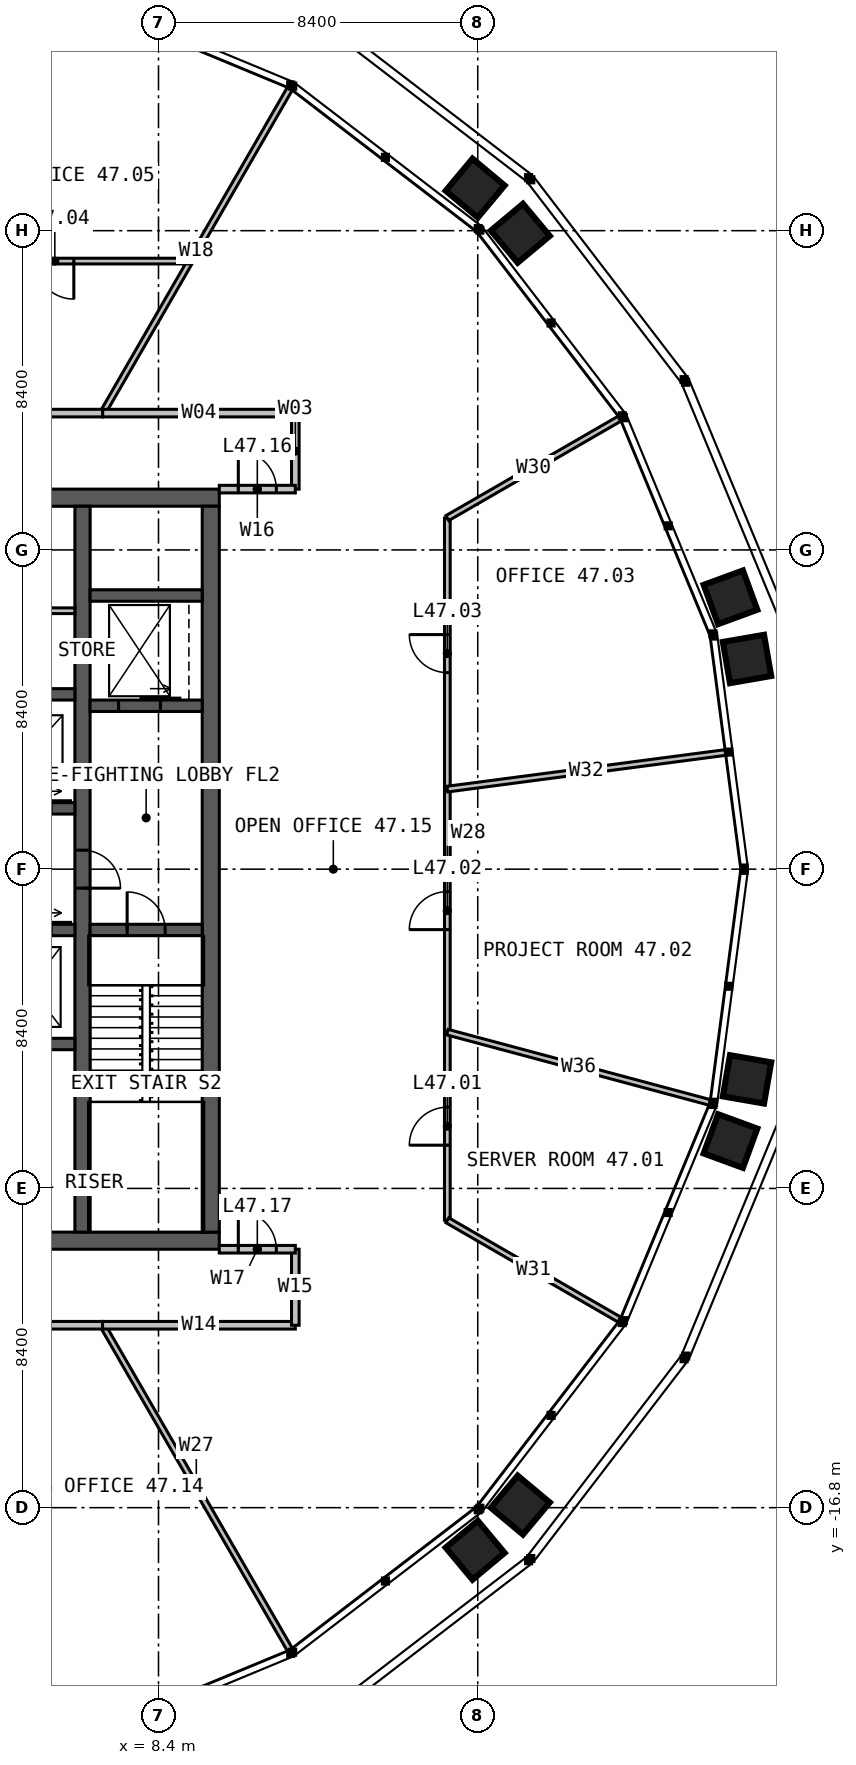
"""IFC4 building model, lengths in metres.
Left out: names, types, materials, properties, quantities, classifications, styles, units other than length and angle.
Written with IfcOpenShell. Run it as: python <this file> out.ifc"""

import sys

from ifc_helpers import new_model, si_unit, direction, frame, frame_2d, origin, place, context, subcontext, project, spatial, rectangle, extrude, element, fill, save


model = new_model("IFC4")
c1 = context("Model", 3, precision=1e-05, world=origin(), true_north=direction((0.0, 1.0)))
c2 = subcontext(c1, "Body", "Model", "MODEL_VIEW")
j1 = project(units=[si_unit("LENGTHUNIT", "METRE"), si_unit("PLANEANGLEUNIT", "RADIAN")], contexts=[c1])
p1 = place(None, origin())
s1 = spatial("IfcSite", under=j1, at=p1, CompositionType="ELEMENT")
p2 = place(p1, origin())
s2 = spatial("IfcBuilding", under=s1, at=p2, CompositionType="ELEMENT")
p3 = place(p2, frame((0.0, 0.0, 195.0)))
s3 = spatial("IfcBuildingStorey", under=s2, at=p3, CompositionType="ELEMENT", Elevation=195.0)
p4 = place(p3, frame((-10.0, 9.775, 0.0), z_axis=(0.0, 0.0, 1.0), x_axis=(1.0, 0.0, 0.0)))
e1 = element("IfcWall", 1, at=p4, inside=s3, PredefinedType="SOLIDWALL", context=c2, shape_type="SweptSolid", body=[
    extrude(rectangle(XDim=20.0, YDim=0.45, at=frame_2d((10.0, 0.0))), origin(), (0.0, 0.0, 1.0), 4.0),
])
p5 = place(p4, frame((9.4, 0.0, 0.0)))
e2 = element("IfcOpeningElement", 2, at=p5, cuts=e1, PredefinedType="OPENING", context=c2, shape_type="SweptSolid", body=[
    extrude(rectangle(XDim=1.2, YDim=2.2, at=frame_2d((0.6, 1.1))), frame((0.0, 0.235, 0.0), z_axis=(0.0, -1.0, 0.0), x_axis=(1.0, 0.0, 0.0)), (0.0, 0.0, 1.0), 0.47),
])
p6 = place(p3, frame((10.0, -9.775, 0.0), z_axis=(0.0, 0.0, 1.0), x_axis=(-1.0, 0.0, 0.0)))
e3 = element("IfcWall", 3, at=p6, inside=s3, PredefinedType="SOLIDWALL", context=c2, shape_type="SweptSolid", body=[
    extrude(rectangle(XDim=20.0, YDim=0.45, at=frame_2d((10.0, 0.0))), origin(), (0.0, 0.0, 1.0), 4.0),
])
p7 = place(p6, frame((6.875, 0.0, 0.0)))
e4 = element("IfcOpeningElement", 4, at=p7, cuts=e3, PredefinedType="OPENING", context=c2, shape_type="SweptSolid", body=[
    extrude(rectangle(XDim=1.2, YDim=2.2, at=frame_2d((0.6, 1.1))), frame((0.0, 0.235, 0.0), z_axis=(0.0, -1.0, 0.0), x_axis=(1.0, 0.0, 0.0)), (0.0, 0.0, 1.0), 0.47),
])
p8 = place(p3, frame((9.775, -9.55, 0.0), z_axis=(0.0, 0.0, 1.0), x_axis=(0.0, 1.0, 0.0)))
e5 = element("IfcWall", 5, at=p8, inside=s3, PredefinedType="SOLIDWALL", context=c2, shape_type="SweptSolid", body=[
    extrude(rectangle(XDim=19.1, YDim=0.45, at=frame_2d((9.55, 0.0))), origin(), (0.0, 0.0, 1.0), 4.0),
])
p9 = place(p3, frame((6.4, 9.55, 0.0), z_axis=(0.0, 0.0, 1.0), x_axis=(0.0, -1.0, 0.0)))
e6 = element("IfcWall", 6, at=p9, inside=s3, PredefinedType="SOLIDWALL", context=c2, shape_type="SweptSolid", body=[
    extrude(rectangle(XDim=19.1, YDim=0.4, at=frame_2d((9.55, 0.0))), origin(), (0.0, 0.0, 1.0), 4.0),
])
p10 = place(p9, frame((9.05, 0.0, 0.0)))
e7 = element("IfcOpeningElement", 7, at=p10, cuts=e6, PredefinedType="OPENING", context=c2, shape_type="SweptSolid", body=[
    extrude(rectangle(XDim=1.0, YDim=2.2, at=frame_2d((0.5, 1.1))), frame((0.0, 0.21, 0.0), z_axis=(0.0, -1.0, 0.0), x_axis=(1.0, 0.0, 0.0)), (0.0, 0.0, 1.0), 0.42),
])
p11 = place(p3, frame((1.35, 1.6, 0.0), z_axis=(0.0, 0.0, 1.0), x_axis=(1.0, 0.0, 0.0)))
e8 = element("IfcWall", 8, at=p11, inside=s3, PredefinedType="SOLIDWALL", context=c2, shape_type="SweptSolid", body=[
    extrude(rectangle(XDim=4.85, YDim=0.3, at=frame_2d((2.425, 0.0))), origin(), (0.0, 0.0, 1.0), 4.0),
])
p12 = place(p11, frame((0.6, 0.0, 0.0)))
e9 = element("IfcOpeningElement", 9, at=p12, cuts=e8, PredefinedType="OPENING", context=c2, shape_type="SweptSolid", body=[
    extrude(rectangle(XDim=1.1, YDim=2.2, at=frame_2d((0.55, 1.1))), frame((0.0, 0.16, 0.0), z_axis=(0.0, -1.0, 0.0), x_axis=(1.0, 0.0, 0.0)), (0.0, 0.0, 1.0), 0.32),
])
p13 = place(p11, frame((3.125, 0.0, 0.0)))
e10 = element("IfcOpeningElement", 10, at=p13, cuts=e8, PredefinedType="OPENING", context=c2, shape_type="SweptSolid", body=[
    extrude(rectangle(XDim=1.1, YDim=2.2, at=frame_2d((0.55, 1.1))), frame((0.0, 0.16, 0.0), z_axis=(0.0, -1.0, 0.0), x_axis=(1.0, 0.0, 0.0)), (0.0, 0.0, 1.0), 0.32),
])
p14 = place(p3, frame((1.35, 4.6, 0.0), z_axis=(0.0, 0.0, 1.0), x_axis=(1.0, 0.0, 0.0)))
e11 = element("IfcWall", 11, at=p14, inside=s3, PredefinedType="SOLIDWALL", context=c2, shape_type="SweptSolid", body=[
    extrude(rectangle(XDim=4.85, YDim=0.3, at=frame_2d((2.425, 0.0))), origin(), (0.0, 0.0, 1.0), 4.0),
])
p15 = place(p3, frame((3.85, -1.6, 0.0), z_axis=(0.0, 0.0, 1.0), x_axis=(1.0, 0.0, 0.0)))
e12 = element("IfcWall", 12, at=p15, inside=s3, PredefinedType="SOLIDWALL", context=c2, shape_type="SweptSolid", body=[
    extrude(rectangle(XDim=2.35, YDim=0.3, at=frame_2d((1.175, 0.0))), origin(), (0.0, 0.0, 1.0), 4.0),
])
p16 = place(p15, frame((0.625, 0.0, 0.0)))
e13 = element("IfcOpeningElement", 13, at=p16, cuts=e12, PredefinedType="OPENING", context=c2, shape_type="SweptSolid", body=[
    extrude(rectangle(XDim=1.1, YDim=2.2, at=frame_2d((0.55, 1.1))), frame((0.0, 0.16, 0.0), z_axis=(0.0, -1.0, 0.0), x_axis=(1.0, 0.0, 0.0)), (0.0, 0.0, 1.0), 0.32),
])
p17 = place(p3, frame((3.85, -4.6, 0.0), z_axis=(0.0, 0.0, 1.0), x_axis=(1.0, 0.0, 0.0)))
e14 = element("IfcWall", 14, at=p17, inside=s3, PredefinedType="SOLIDWALL", context=c2, shape_type="SweptSolid", body=[
    extrude(rectangle(XDim=2.35, YDim=0.3, at=frame_2d((1.175, 0.0))), origin(), (0.0, 0.0, 1.0), 4.0),
])
p18 = place(p3, frame((6.6, -1.6, 0.0), z_axis=(0.0, 0.0, 1.0), x_axis=(1.0, 0.0, 0.0)))
e15 = element("IfcWall", 15, at=p18, inside=s3, PredefinedType="SOLIDWALL", context=c2, shape_type="SweptSolid", body=[
    extrude(rectangle(XDim=2.95, YDim=0.3, at=frame_2d((1.475, 0.0))), origin(), (0.0, 0.0, 1.0), 4.0),
])
p19 = place(p18, frame((0.975, 0.0, 0.0)))
e16 = element("IfcOpeningElement", 16, at=p19, cuts=e15, PredefinedType="OPENING", context=c2, shape_type="SweptSolid", body=[
    extrude(rectangle(XDim=1.0, YDim=2.2, at=frame_2d((0.5, 1.1))), frame((0.0, 0.16, 0.0), z_axis=(0.0, -1.0, 0.0), x_axis=(1.0, 0.0, 0.0)), (0.0, 0.0, 1.0), 0.32),
])
p20 = place(p3, frame((6.6, 4.3, 0.0), z_axis=(0.0, 0.0, 1.0), x_axis=(1.0, 0.0, 0.0)))
e17 = element("IfcWall", 17, at=p20, inside=s3, PredefinedType="SOLIDWALL", context=c2, shape_type="SweptSolid", body=[
    extrude(rectangle(XDim=2.95, YDim=0.3, at=frame_2d((1.475, 0.0))), origin(), (0.0, 0.0, 1.0), 4.0),
])
p21 = place(p20, frame((0.75, 0.0, 0.0)))
e18 = element("IfcOpeningElement", 18, at=p21, cuts=e17, PredefinedType="OPENING", context=c2, shape_type="SweptSolid", body=[
    extrude(rectangle(XDim=1.1, YDim=2.2, at=frame_2d((0.55, 1.1))), frame((0.0, 0.16, 0.0), z_axis=(0.0, -1.0, 0.0), x_axis=(1.0, 0.0, 0.0)), (0.0, 0.0, 1.0), 0.32),
])
p22 = place(p3, frame((6.6, 7.2, 0.0), z_axis=(0.0, 0.0, 1.0), x_axis=(1.0, 0.0, 0.0)))
e19 = element("IfcWall", 19, at=p22, inside=s3, PredefinedType="SOLIDWALL", context=c2, shape_type="SweptSolid", body=[
    extrude(rectangle(XDim=2.95, YDim=0.3, at=frame_2d((1.475, 0.0))), origin(), (0.0, 0.0, 1.0), 4.0),
])
p23 = place(p3, frame((1.35, 6.8, 0.0), z_axis=(0.0, 0.0, 1.0), x_axis=(1.0, 0.0, 0.0)))
e20 = element("IfcWall", 20, at=p23, inside=s3, PredefinedType="PARTITIONING", context=c2, shape_type="SweptSolid", body=[
    extrude(rectangle(XDim=4.85, YDim=0.15, at=frame_2d((2.425, 0.0))), origin(), (0.0, 0.0, 1.0), 3.75),
])
p24 = place(p23, frame((3.15, 0.0, 0.0)))
e21 = element("IfcOpeningElement", 21, at=p24, cuts=e20, PredefinedType="OPENING", context=c2, shape_type="SweptSolid", body=[
    extrude(rectangle(XDim=0.9, YDim=2.2, at=frame_2d((0.45, 1.1))), frame((0.0, 0.085, 0.0), z_axis=(0.0, -1.0, 0.0), x_axis=(1.0, 0.0, 0.0)), (0.0, 0.0, 1.0), 0.17),
])
for number, where, z_axis, x_axis in (
    (22, (6.928, 12.0, 0.0), (0.0, 0.0, 1.0), (0.5, 0.866, 0.0)),
    (23, (6.928, -12.0, 0.0), (0.0, 0.0, 1.0), (0.5, -0.866, 0.0)),
):
    element("IfcWall", number, at=place(p3, frame(where, z_axis=z_axis, x_axis=x_axis)), inside=s3, PredefinedType="PARTITIONING", context=c2, shape_type="SweptSolid", body=[
        extrude(rectangle(XDim=9.865, YDim=0.15, at=frame_2d((4.932, 0.0))), origin(), (0.0, 0.0, 1.0), 2.79),
    ])
p25 = place(p3, frame((16.0, -9.238, 0.0), z_axis=(0.0, 0.0, 1.0), x_axis=(0.0, 1.0, 0.0)))
e24 = element("IfcWall", 24, at=p25, inside=s3, PredefinedType="PARTITIONING", context=c2, shape_type="SweptSolid", body=[
    extrude(rectangle(XDim=18.475, YDim=0.15, at=frame_2d((9.238, 0.0))), origin(), (0.0, 0.0, 1.0), 2.79),
])
p26 = place(p25, frame((1.975, 0.0, 0.0)))
e25 = element("IfcOpeningElement", 25, at=p26, cuts=e24, PredefinedType="OPENING", context=c2, shape_type="SweptSolid", body=[
    extrude(rectangle(XDim=1.0, YDim=2.2, at=frame_2d((0.5, 1.1))), frame((0.0, 0.085, 0.0), z_axis=(0.0, -1.0, 0.0), x_axis=(1.0, 0.0, 0.0)), (0.0, 0.0, 1.0), 0.17),
])
p27 = place(p25, frame((7.647, 0.0, 0.0)))
e26 = element("IfcOpeningElement", 26, at=p27, cuts=e24, PredefinedType="OPENING", context=c2, shape_type="SweptSolid", body=[
    extrude(rectangle(XDim=1.0, YDim=2.2, at=frame_2d((0.5, 1.1))), frame((0.0, 0.085, 0.0), z_axis=(0.0, -1.0, 0.0), x_axis=(1.0, 0.0, 0.0)), (0.0, 0.0, 1.0), 0.17),
])
p28 = place(p25, frame((14.41, 0.0, 0.0)))
e27 = element("IfcOpeningElement", 27, at=p28, cuts=e24, PredefinedType="OPENING", context=c2, shape_type="SweptSolid", body=[
    extrude(rectangle(XDim=1.0, YDim=2.2, at=frame_2d((0.5, 1.1))), frame((0.0, 0.085, 0.0), z_axis=(0.0, -1.0, 0.0), x_axis=(1.0, 0.0, 0.0)), (0.0, 0.0, 1.0), 0.17),
])
for number, where, z_axis, x_axis in (
    (28, (16.0, -9.238, 0.0), (0.0, 0.0, 1.0), (0.866, -0.5, 0.0)),
    (29, (16.0, 9.238, 0.0), (0.0, 0.0, 1.0), (0.866, 0.5, 0.0)),
):
    element("IfcWall", number, at=place(p3, frame(where, z_axis=z_axis, x_axis=x_axis)), inside=s3, PredefinedType="PARTITIONING", context=c2, shape_type="SweptSolid", body=[
        extrude(rectangle(XDim=5.246, YDim=0.15, at=frame_2d((2.623, 0.0))), origin(), (0.0, 0.0, 1.0), 2.79),
    ])
p29 = place(p3, frame((16.0, -4.287, 0.0), z_axis=(0.0, 0.0, 1.0), x_axis=(0.965925667522, -0.25881963763, 0.0)))
e30 = element("IfcWall", 30, at=p29, inside=s3, PredefinedType="PARTITIONING", context=c2, shape_type="SweptSolid", body=[
    extrude(rectangle(XDim=7.157, YDim=0.15, at=frame_2d((3.578, 0.0))), origin(), (0.0, 0.0, 1.0), 2.79),
])
p30 = place(p3, frame((16.0, 2.106, 0.0), z_axis=(0.0, 0.0, 1.0), x_axis=(0.991443821111, 0.130534093561, 0.0)))
e31 = element("IfcWall", 31, at=p30, inside=s3, PredefinedType="PARTITIONING", context=c2, shape_type="SweptSolid", body=[
    extrude(rectangle(XDim=7.38, YDim=0.15, at=frame_2d((3.69, 0.0))), origin(), (0.0, 0.0, 1.0), 2.79),
])
p31 = place(p3, frame((12.0, 10.0, 0.0), z_axis=(0.0, 0.0, 1.0), x_axis=(0.0, 1.0, 0.0)))
e32 = element("IfcWall", 32, at=p31, inside=s3, PredefinedType="PARTITIONING", context=c2, shape_type="SweptSolid", body=[
    extrude(rectangle(XDim=2.0, YDim=0.2, at=frame_2d((1.0, 0.0))), origin(), (0.0, 0.0, 1.0), 3.8),
])
p32 = place(p3, frame((12.0, 12.0, 0.0), z_axis=(0.0, 0.0, 1.0), x_axis=(-1.0, 0.0, 0.0)))
e33 = element("IfcWall", 33, at=p32, inside=s3, PredefinedType="PARTITIONING", context=c2, shape_type="SweptSolid", body=[
    extrude(rectangle(XDim=5.072, YDim=0.2, at=frame_2d((2.536, 0.0))), origin(), (0.0, 0.0, 1.0), 3.8),
])
p33 = place(p3, frame((9.238, 16.0, 0.0), z_axis=(0.0, 0.0, 1.0), x_axis=(-1.0, 0.0, 0.0)))
e34 = element("IfcWall", 34, at=p33, inside=s3, PredefinedType="PARTITIONING", context=c2, shape_type="SweptSolid", body=[
    extrude(rectangle(XDim=18.475, YDim=0.15, at=frame_2d((9.238, 0.0))), origin(), (0.0, 0.0, 1.0), 2.79),
])
p34 = place(p33, frame((3.066, 0.0, 0.0)))
e35 = element("IfcOpeningElement", 35, at=p34, cuts=e34, PredefinedType="OPENING", context=c2, shape_type="SweptSolid", body=[
    extrude(rectangle(XDim=1.0, YDim=2.2, at=frame_2d((0.5, 1.1))), frame((0.0, 0.085, 0.0), z_axis=(0.0, -1.0, 0.0), x_axis=(1.0, 0.0, 0.0)), (0.0, 0.0, 1.0), 0.17),
])
p35 = place(p33, frame((8.738, 0.0, 0.0)))
e36 = element("IfcOpeningElement", 36, at=p35, cuts=e34, PredefinedType="OPENING", context=c2, shape_type="SweptSolid", body=[
    extrude(rectangle(XDim=1.0, YDim=2.2, at=frame_2d((0.5, 1.1))), frame((0.0, 0.085, 0.0), z_axis=(0.0, -1.0, 0.0), x_axis=(1.0, 0.0, 0.0)), (0.0, 0.0, 1.0), 0.17),
])
p36 = place(p33, frame((13.104, 0.0, 0.0)))
e37 = element("IfcOpeningElement", 37, at=p36, cuts=e34, PredefinedType="OPENING", context=c2, shape_type="SweptSolid", body=[
    extrude(rectangle(XDim=1.0, YDim=2.2, at=frame_2d((0.5, 1.1))), frame((0.0, 0.085, 0.0), z_axis=(0.0, -1.0, 0.0), x_axis=(1.0, 0.0, 0.0)), (0.0, 0.0, 1.0), 0.17),
])
p37 = place(p33, frame((16.67, 0.0, 0.0)))
e38 = element("IfcOpeningElement", 38, at=p37, cuts=e34, PredefinedType="OPENING", context=c2, shape_type="SweptSolid", body=[
    extrude(rectangle(XDim=1.0, YDim=2.2, at=frame_2d((0.5, 1.1))), frame((0.0, 0.085, 0.0), z_axis=(0.0, -1.0, 0.0), x_axis=(1.0, 0.0, 0.0)), (0.0, 0.0, 1.0), 0.17),
])
p38 = place(p3, frame((6.928, 12.0, 0.0), z_axis=(0.0, 0.0, 1.0), x_axis=(-1.0, 0.0, 0.0)))
e39 = element("IfcWall", 39, at=p38, inside=s3, PredefinedType="PARTITIONING", context=c2, shape_type="SweptSolid", body=[
    extrude(rectangle(XDim=13.856, YDim=0.2, at=frame_2d((6.928, 0.0))), origin(), (0.0, 0.0, 1.0), 3.8),
])
p39 = place(p38, frame((6.028, 0.0, 0.0)))
e40 = element("IfcOpeningElement", 40, at=p39, cuts=e39, PredefinedType="OPENING", context=c2, shape_type="SweptSolid", body=[
    extrude(rectangle(XDim=1.8, YDim=2.2, at=frame_2d((0.9, 1.1))), frame((0.0, 0.11, 0.0), z_axis=(0.0, -1.0, 0.0), x_axis=(1.0, 0.0, 0.0)), (0.0, 0.0, 1.0), 0.22),
])
p40 = place(p3, frame((0.0, -12.0, 0.0), z_axis=(0.0, 0.0, 1.0), x_axis=(1.0, 0.0, 0.0)))
e41 = element("IfcWall", 41, at=p40, inside=s3, PredefinedType="PARTITIONING", context=c2, shape_type="SweptSolid", body=[
    extrude(rectangle(XDim=6.928, YDim=0.2, at=frame_2d((3.464, 0.0))), origin(), (0.0, 0.0, 1.0), 3.8),
])
p41 = place(p40, frame((2.564, 0.0, 0.0)))
e42 = element("IfcOpeningElement", 42, at=p41, cuts=e41, PredefinedType="OPENING", context=c2, shape_type="SweptSolid", body=[
    extrude(rectangle(XDim=1.8, YDim=2.2, at=frame_2d((0.9, 1.1))), frame((0.0, 0.11, 0.0), z_axis=(0.0, -1.0, 0.0), x_axis=(1.0, 0.0, 0.0)), (0.0, 0.0, 1.0), 0.22),
])
p42 = place(p3, frame((6.928, -12.0, 0.0), z_axis=(0.0, 0.0, 1.0), x_axis=(1.0, 0.0, 0.0)))
e43 = element("IfcWall", 43, at=p42, inside=s3, PredefinedType="PARTITIONING", context=c2, shape_type="SweptSolid", body=[
    extrude(rectangle(XDim=5.072, YDim=0.2, at=frame_2d((2.536, 0.0))), origin(), (0.0, 0.0, 1.0), 3.8),
])
p43 = place(p3, frame((12.0, -12.0, 0.0), z_axis=(0.0, 0.0, 1.0), x_axis=(0.0, 1.0, 0.0)))
e44 = element("IfcWall", 44, at=p43, inside=s3, PredefinedType="PARTITIONING", context=c2, shape_type="SweptSolid", body=[
    extrude(rectangle(XDim=2.0, YDim=0.2, at=frame_2d((1.0, 0.0))), origin(), (0.0, 0.0, 1.0), 3.8),
])
p44 = place(p3, frame((10.0, 10.0, 0.0), z_axis=(0.0, 0.0, 1.0), x_axis=(1.0, 0.0, 0.0)))
e45 = element("IfcWall", 45, at=p44, inside=s3, PredefinedType="PARTITIONING", context=c2, shape_type="SweptSolid", body=[
    extrude(rectangle(XDim=2.0, YDim=0.2, at=frame_2d((1.0, 0.0))), origin(), (0.0, 0.0, 1.0), 3.8),
])
p45 = place(p44, frame((0.5, 0.0, 0.0)))
e46 = element("IfcOpeningElement", 46, at=p45, cuts=e45, PredefinedType="OPENING", context=c2, shape_type="SweptSolid", body=[
    extrude(rectangle(XDim=1.0, YDim=2.2, at=frame_2d((0.5, 1.1))), frame((0.0, 0.11, 0.0), z_axis=(0.0, -1.0, 0.0), x_axis=(1.0, 0.0, 0.0)), (0.0, 0.0, 1.0), 0.22),
])
p46 = place(p3, frame((10.0, -10.0, 0.0), z_axis=(0.0, 0.0, 1.0), x_axis=(1.0, 0.0, 0.0)))
e47 = element("IfcWall", 47, at=p46, inside=s3, PredefinedType="PARTITIONING", context=c2, shape_type="SweptSolid", body=[
    extrude(rectangle(XDim=2.0, YDim=0.2, at=frame_2d((1.0, 0.0))), origin(), (0.0, 0.0, 1.0), 3.8),
])
p47 = place(p46, frame((0.5, 0.0, 0.0)))
e48 = element("IfcOpeningElement", 48, at=p47, cuts=e47, PredefinedType="OPENING", context=c2, shape_type="SweptSolid", body=[
    extrude(rectangle(XDim=1.0, YDim=2.2, at=frame_2d((0.5, 1.1))), frame((0.0, 0.11, 0.0), z_axis=(0.0, -1.0, 0.0), x_axis=(1.0, 0.0, 0.0)), (0.0, 0.0, 1.0), 0.22),
])
p48 = place(p10, origin())
e49 = element("IfcDoor", 49, at=p48, inside=s3, OperationType="SINGLE_SWING_RIGHT", PredefinedType="DOOR", context=c2, shape_type="SweptSolid", body=[
    extrude(rectangle(XDim=1.0, YDim=2.2, at=frame_2d((0.5, 1.1))), frame((0.0, 0.025, 0.0), z_axis=(0.0, -1.0, 0.0), x_axis=(1.0, 0.0, 0.0)), (0.0, 0.0, 1.0), 0.05),
])
fill(e7, e49)
p49 = place(p19, origin())
e50 = element("IfcDoor", 50, at=p49, inside=s3, OperationType="SINGLE_SWING_LEFT", PredefinedType="DOOR", context=c2, shape_type="SweptSolid", body=[
    extrude(rectangle(XDim=1.0, YDim=2.2, at=frame_2d((0.5, 1.1))), frame((0.0, 0.025, 0.0), z_axis=(0.0, -1.0, 0.0), x_axis=(1.0, 0.0, 0.0)), (0.0, 0.0, 1.0), 0.05),
])
fill(e16, e50)
p50 = place(p21, origin())
e51 = element("IfcDoor", 51, at=p50, inside=s3, OperationType="SLIDING_TO_LEFT", PredefinedType="DOOR", context=c2, shape_type="SweptSolid", body=[
    extrude(rectangle(XDim=1.1, YDim=2.2, at=frame_2d((0.55, 1.1))), frame((0.0, 0.025, 0.0), z_axis=(0.0, -1.0, 0.0), x_axis=(1.0, 0.0, 0.0)), (0.0, 0.0, 1.0), 0.05),
])
fill(e18, e51)
p51 = place(p26, origin())
e52 = element("IfcDoor", 52, at=p51, inside=s3, OperationType="SINGLE_SWING_LEFT", PredefinedType="DOOR", context=c2, shape_type="SweptSolid", body=[
    extrude(rectangle(XDim=1.0, YDim=2.2, at=frame_2d((0.5, 1.1))), frame((0.0, 0.025, 0.0), z_axis=(0.0, -1.0, 0.0), x_axis=(1.0, 0.0, 0.0)), (0.0, 0.0, 1.0), 0.05),
])
fill(e25, e52)
p52 = place(p27, origin())
e53 = element("IfcDoor", 53, at=p52, inside=s3, OperationType="SINGLE_SWING_LEFT", PredefinedType="DOOR", context=c2, shape_type="SweptSolid", body=[
    extrude(rectangle(XDim=1.0, YDim=2.2, at=frame_2d((0.5, 1.1))), frame((0.0, 0.025, 0.0), z_axis=(0.0, -1.0, 0.0), x_axis=(1.0, 0.0, 0.0)), (0.0, 0.0, 1.0), 0.05),
])
fill(e26, e53)
p53 = place(p28, origin())
e54 = element("IfcDoor", 54, at=p53, inside=s3, OperationType="SINGLE_SWING_RIGHT", PredefinedType="DOOR", context=c2, shape_type="SweptSolid", body=[
    extrude(rectangle(XDim=1.0, YDim=2.2, at=frame_2d((0.5, 1.1))), frame((0.0, 0.025, 0.0), z_axis=(0.0, -1.0, 0.0), x_axis=(1.0, 0.0, 0.0)), (0.0, 0.0, 1.0), 0.05),
])
fill(e27, e54)
p54 = place(p34, origin())
e55 = element("IfcDoor", 55, at=p54, inside=s3, OperationType="SINGLE_SWING_LEFT", PredefinedType="DOOR", context=c2, shape_type="SweptSolid", body=[
    extrude(rectangle(XDim=1.0, YDim=2.2, at=frame_2d((0.5, 1.1))), frame((0.0, 0.025, 0.0), z_axis=(0.0, -1.0, 0.0), x_axis=(1.0, 0.0, 0.0)), (0.0, 0.0, 1.0), 0.05),
])
fill(e35, e55)
p55 = place(p45, origin())
e56 = element("IfcDoor", 56, at=p55, inside=s3, OperationType="SINGLE_SWING_LEFT", PredefinedType="DOOR", context=c2, shape_type="SweptSolid", body=[
    extrude(rectangle(XDim=1.0, YDim=2.2, at=frame_2d((0.5, 1.1))), frame((0.0, 0.025, 0.0), z_axis=(0.0, -1.0, 0.0), x_axis=(1.0, 0.0, 0.0)), (0.0, 0.0, 1.0), 0.05),
])
fill(e46, e56)
p56 = place(p47, origin())
e57 = element("IfcDoor", 57, at=p56, inside=s3, OperationType="SINGLE_SWING_LEFT", PredefinedType="DOOR", context=c2, shape_type="SweptSolid", body=[
    extrude(rectangle(XDim=1.0, YDim=2.2, at=frame_2d((0.5, 1.1))), frame((0.0, 0.025, 0.0), z_axis=(0.0, -1.0, 0.0), x_axis=(1.0, 0.0, 0.0)), (0.0, 0.0, 1.0), 0.05),
])
fill(e48, e57)
save(model, sys.argv[1])
